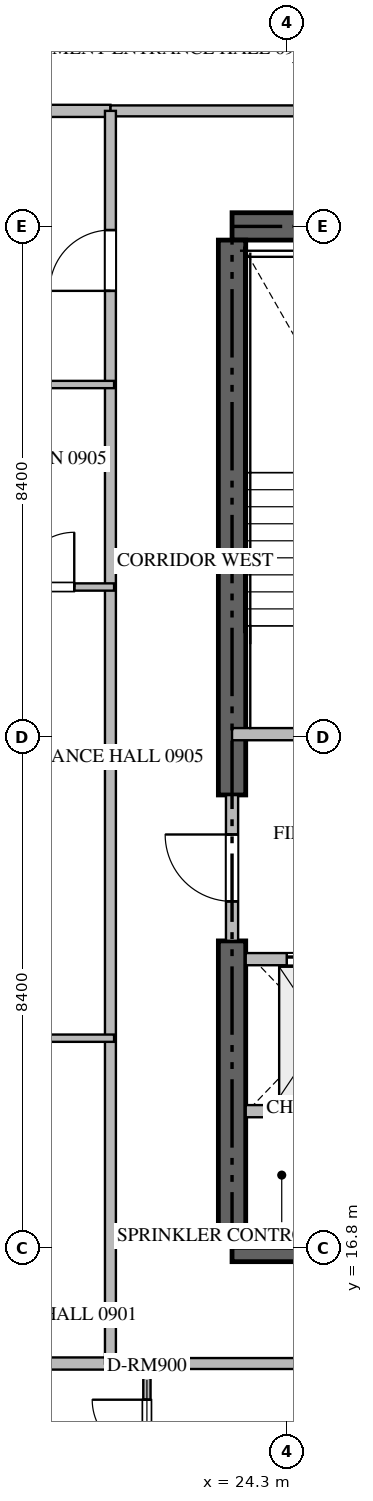
"""IFC4 building model, lengths in metres.
Left out: names, types, materials, properties, quantities, classifications, styles, units other than length and angle.
Written with IfcOpenShell. Run it as: python <this file> out.ifc"""

import sys

from ifc_helpers import new_model, si_unit, direction, frame, frame_2d, origin, place, context, subcontext, project, spatial, rectangle, extrude, source, transform, mapped, element, fill, save


model = new_model("IFC4")
c1 = context("Model", 3, precision=1e-05, world=origin(), true_north=direction((0.0, 1.0)))
c2 = subcontext(c1, "Body", "Model", "MODEL_VIEW")
j1 = project(units=[si_unit("LENGTHUNIT", "METRE"), si_unit("PLANEANGLEUNIT", "RADIAN")], contexts=[c1])
p1 = place(None, origin())
s1 = spatial("IfcSite", under=j1, at=p1, CompositionType="ELEMENT")
p2 = place(p1, origin())
s2 = spatial("IfcBuilding", under=s1, at=p2, CompositionType="ELEMENT")
p3 = place(p2, frame((0.0, 0.0, 41.7)))
s3 = spatial("IfcBuildingStorey", under=s2, at=p3, CompositionType="ELEMENT", Elevation=41.7)
for number, where, z_axis, x_axis in (
    (1, (23.4, 16.8, -0.26), (0.0, 0.0, 1.0), (1.0, 0.0, 0.0)),
    (2, (41.4, 33.6, -0.26), (0.0, 0.0, 1.0), (-1.0, 0.0, 0.0)),
):
    element("IfcWall", number, at=place(p3, frame(where, z_axis=z_axis, x_axis=x_axis)), inside=s3, PredefinedType="SHEAR", context=c2, shape_type="SweptSolid", body=[
        extrude(rectangle(XDim=18.0, YDim=0.45, at=frame_2d((9.0, 0.0))), origin(), (0.0, 0.0, 1.0), 3.748),
    ])
p4 = place(p3, frame((23.4, 17.025, -0.26), z_axis=(0.0, 0.0, 1.0), x_axis=(0.0, 1.0, 0.0)))
e3 = element("IfcWall", 3, at=p4, inside=s3, PredefinedType="SHEAR", context=c2, shape_type="SweptSolid", body=[
    extrude(rectangle(XDim=4.825, YDim=0.45, at=frame_2d((2.413, 0.0))), origin(), (0.0, 0.0, 1.0), 3.748),
])
p5 = place(p3, frame((23.4, 24.25, -0.26), z_axis=(0.0, 0.0, 1.0), x_axis=(0.0, 1.0, 0.0)))
e4 = element("IfcWall", 4, at=p5, inside=s3, PredefinedType="SHEAR", context=c2, shape_type="SweptSolid", body=[
    extrude(rectangle(XDim=9.125, YDim=0.45, at=frame_2d((4.562, 0.0))), origin(), (0.0, 0.0, 1.0), 3.748),
])
p6 = place(p3, frame((23.4, 25.25, 0.0), z_axis=(0.0, 0.0, 1.0), x_axis=(1.0, 0.0, 0.0)))
e5 = element("IfcWall", 5, at=p6, inside=s3, PredefinedType="STANDARD", context=c2, shape_type="SweptSolid", body=[
    extrude(rectangle(XDim=4.45, YDim=0.2, at=frame_2d((2.225, 0.0))), origin(), (0.0, 0.0, 1.0), 3.49),
])
p7 = place(p6, frame((1.65, 0.0, 0.0)))
e6 = element("IfcOpeningElement", 6, at=p7, cuts=e5, PredefinedType="OPENING", context=c2, shape_type="SweptSolid", body=[
    extrude(rectangle(XDim=1.1, YDim=2.15, at=frame_2d((0.55, 1.075))), frame((0.0, 0.11, 0.0), z_axis=(0.0, -1.0, 0.0), x_axis=(1.0, 0.0, 0.0)), (0.0, 0.0, 1.0), 0.22),
])
p8 = place(p3, frame((23.625, 21.55, 0.0), z_axis=(0.0, 0.0, 1.0), x_axis=(1.0, 0.0, 0.0)))
e7 = element("IfcWall", 7, at=p8, inside=s3, PredefinedType="STANDARD", context=c2, shape_type="SweptSolid", body=[
    extrude(rectangle(XDim=2.425, YDim=0.2, at=frame_2d((1.212, 0.0))), origin(), (0.0, 0.0, 1.0), 3.49),
])
p9 = place(p8, frame((0.675, 0.0, 0.0)))
e8 = element("IfcOpeningElement", 8, at=p9, cuts=e7, PredefinedType="OPENING", context=c2, shape_type="SweptSolid", body=[
    extrude(rectangle(XDim=1.2, YDim=2.2, at=frame_2d((0.6, 1.1))), frame((0.0, 0.11, 0.0), z_axis=(0.0, -1.0, 0.0), x_axis=(1.0, 0.0, 0.0)), (0.0, 0.0, 1.0), 0.22),
])
p10 = place(p3, frame((23.625, 19.05, 0.0), z_axis=(0.0, 0.0, 1.0), x_axis=(1.0, 0.0, 0.0)))
e9 = element("IfcWall", 9, at=p10, inside=s3, PredefinedType="STANDARD", context=c2, shape_type="SweptSolid", body=[
    extrude(rectangle(XDim=2.425, YDim=0.2, at=frame_2d((1.212, 0.0))), origin(), (0.0, 0.0, 1.0), 3.49),
])
p11 = place(p3, frame((23.4, 21.852, 0.0), z_axis=(0.0, 0.0, 1.0), x_axis=(0.0, 1.0, 0.0)))
e10 = element("IfcWall", 10, at=p11, inside=s3, PredefinedType="STANDARD", context=c2, shape_type="SweptSolid", body=[
    extrude(rectangle(XDim=2.396, YDim=0.2, at=frame_2d((1.198, 0.0))), origin(), (0.0, 0.0, 1.0), 3.49),
])
p12 = place(p11, frame((0.648, 0.0, 0.0)))
e11 = element("IfcOpeningElement", 11, at=p12, cuts=e10, PredefinedType="OPENING", context=c2, shape_type="SweptSolid", body=[
    extrude(rectangle(XDim=1.1, YDim=2.15, at=frame_2d((0.55, 1.075))), frame((0.0, 0.11, 0.0), z_axis=(0.0, -1.0, 0.0), x_axis=(1.0, 0.0, 0.0)), (0.0, 0.0, 1.0), 0.22),
])
for number, where, z_axis, x_axis in (
    (12, (6.082, 14.9, 0.0), (0.0, 0.0, 1.0), (1.0, 0.0, 0.0)),
    (13, (6.082, 35.5, 0.0), (0.0, 0.0, 1.0), (1.0, 0.0, 0.0)),
):
    element("IfcWall", number, at=place(p3, frame(where, z_axis=z_axis, x_axis=x_axis)), inside=s3, PredefinedType="PARTITIONING", context=c2, shape_type="SweptSolid", body=[
        extrude(rectangle(XDim=15.318, YDim=0.2, at=frame_2d((7.659, 0.0))), origin(), (0.0, 0.0, 1.0), 3.49),
    ])
p13 = place(p3, frame((21.402, 14.9, 0.0), z_axis=(0.0, 0.0, 1.0), x_axis=(1.0, 0.0, 0.0)))
e14 = element("IfcWall", 14, at=p13, inside=s3, PredefinedType="PARTITIONING", context=c2, shape_type="SweptSolid", body=[
    extrude(rectangle(XDim=21.996, YDim=0.18, at=frame_2d((10.998, 0.0))), origin(), (0.0, 0.0, 1.0), 3.49),
])
p14 = place(p13, frame((5.816, 0.0, 0.0)))
e15 = element("IfcOpeningElement", 15, at=p14, cuts=e14, PredefinedType="OPENING", context=c2, shape_type="SweptSolid", body=[
    extrude(rectangle(XDim=1.0, YDim=2.15, at=frame_2d((0.5, 1.075))), frame((0.0, 0.1, 0.0), z_axis=(0.0, -1.0, 0.0), x_axis=(1.0, 0.0, 0.0)), (0.0, 0.0, 1.0), 0.2),
])
p15 = place(p13, frame((11.044, 0.0, 0.0)))
e16 = element("IfcOpeningElement", 16, at=p15, cuts=e14, PredefinedType="OPENING", context=c2, shape_type="SweptSolid", body=[
    extrude(rectangle(XDim=1.0, YDim=2.15, at=frame_2d((0.5, 1.075))), frame((0.0, 0.1, 0.0), z_axis=(0.0, -1.0, 0.0), x_axis=(1.0, 0.0, 0.0)), (0.0, 0.0, 1.0), 0.2),
])
p16 = place(p3, frame((21.402, 35.5, 0.0), z_axis=(0.0, 0.0, 1.0), x_axis=(1.0, 0.0, 0.0)))
e17 = element("IfcWall", 17, at=p16, inside=s3, PredefinedType="PARTITIONING", context=c2, shape_type="SweptSolid", body=[
    extrude(rectangle(XDim=21.996, YDim=0.18, at=frame_2d((10.998, 0.0))), origin(), (0.0, 0.0, 1.0), 3.49),
])
p17 = place(p16, frame((9.952, 0.0, 0.0)))
e18 = element("IfcOpeningElement", 18, at=p17, cuts=e17, PredefinedType="OPENING", context=c2, shape_type="SweptSolid", body=[
    extrude(rectangle(XDim=1.0, YDim=2.15, at=frame_2d((0.5, 1.075))), frame((0.0, 0.1, 0.0), z_axis=(0.0, -1.0, 0.0), x_axis=(1.0, 0.0, 0.0)), (0.0, 0.0, 1.0), 0.2),
])
p18 = place(p16, frame((15.18, 0.0, 0.0)))
e19 = element("IfcOpeningElement", 19, at=p18, cuts=e17, PredefinedType="OPENING", context=c2, shape_type="SweptSolid", body=[
    extrude(rectangle(XDim=1.0, YDim=2.15, at=frame_2d((0.5, 1.075))), frame((0.0, 0.1, 0.0), z_axis=(0.0, -1.0, 0.0), x_axis=(1.0, 0.0, 0.0)), (0.0, 0.0, 1.0), 0.2),
])
p19 = place(p3, frame((21.4, 14.9, 0.0), z_axis=(0.0, 0.0, 1.0), x_axis=(0.0, 1.0, 0.0)))
e20 = element("IfcWall", 20, at=p19, inside=s3, PredefinedType="PARTITIONING", context=c2, shape_type="SweptSolid", body=[
    extrude(rectangle(XDim=20.6, YDim=0.18, at=frame_2d((10.3, 0.0))), origin(), (0.0, 0.0, 1.0), 3.49),
])
p20 = place(p19, frame((17.64, 0.0, 0.0)))
e21 = element("IfcOpeningElement", 21, at=p20, cuts=e20, PredefinedType="OPENING", context=c2, shape_type="SweptSolid", body=[
    extrude(rectangle(XDim=1.0, YDim=2.15, at=frame_2d((0.5, 1.075))), frame((0.0, 0.1, 0.0), z_axis=(0.0, -1.0, 0.0), x_axis=(1.0, 0.0, 0.0)), (0.0, 0.0, 1.0), 0.2),
])
p21 = place(p3, frame((22.0, 12.75, 0.0), z_axis=(0.0, 0.0, 1.0), x_axis=(0.0, 1.0, 0.0)))
e22 = element("IfcWall", 22, at=p21, inside=s3, PredefinedType="PARTITIONING", context=c2, shape_type="SweptSolid", body=[
    extrude(rectangle(XDim=2.21, YDim=0.12, at=frame_2d((1.105, 0.0))), origin(), (0.0, 0.0, 1.0), 3.49),
])
p22 = place(p21, frame((0.655, 0.0, 0.0)))
e23 = element("IfcOpeningElement", 23, at=p22, cuts=e22, PredefinedType="OPENING", context=c2, shape_type="SweptSolid", body=[
    extrude(rectangle(XDim=0.9, YDim=2.1, at=frame_2d((0.45, 1.05))), frame((0.0, 0.07, 0.0), z_axis=(0.0, -1.0, 0.0), x_axis=(1.0, 0.0, 0.0)), (0.0, 0.0, 1.0), 0.14),
])
p23 = place(p3, frame((18.65, 31.0, 0.0), z_axis=(0.0, 0.0, 1.0), x_axis=(1.0, 0.0, 0.0)))
e24 = element("IfcWall", 24, at=p23, inside=s3, PredefinedType="PARTITIONING", context=c2, shape_type="SweptSolid", body=[
    extrude(rectangle(XDim=2.81, YDim=0.12, at=frame_2d((1.405, 0.0))), origin(), (0.0, 0.0, 1.0), 3.49),
])
p24 = place(p3, frame((19.25, 27.67, 0.0), z_axis=(0.0, 0.0, 1.0), x_axis=(1.0, 0.0, 0.0)))
e25 = element("IfcWall", 25, at=p24, inside=s3, PredefinedType="PARTITIONING", context=c2, shape_type="SweptSolid", body=[
    extrude(rectangle(XDim=2.21, YDim=0.12, at=frame_2d((1.105, 0.0))), origin(), (0.0, 0.0, 1.0), 3.49),
])
p25 = place(p24, frame((0.655, 0.0, 0.0)))
e26 = element("IfcOpeningElement", 26, at=p25, cuts=e25, PredefinedType="OPENING", context=c2, shape_type="SweptSolid", body=[
    extrude(rectangle(XDim=0.9, YDim=2.1, at=frame_2d((0.45, 1.05))), frame((0.0, 0.07, 0.0), z_axis=(0.0, -1.0, 0.0), x_axis=(1.0, 0.0, 0.0)), (0.0, 0.0, 1.0), 0.14),
])
p26 = place(p3, frame((19.252, 20.25, 0.0), z_axis=(0.0, 0.0, 1.0), x_axis=(1.0, 0.0, 0.0)))
e27 = element("IfcWall", 27, at=p26, inside=s3, PredefinedType="PARTITIONING", context=c2, shape_type="SweptSolid", body=[
    extrude(rectangle(XDim=2.208, YDim=0.12, at=frame_2d((1.104, 0.0))), origin(), (0.0, 0.0, 1.0), 3.49),
])
m1 = source(origin(), c2, "Body", "SweptSolid", [
    extrude(rectangle(XDim=1.2, YDim=2.2, at=frame_2d((0.6, 1.1))), frame((0.0, 0.025, 0.0), z_axis=(0.0, -1.0, 0.0), x_axis=(1.0, 0.0, 0.0)), (0.0, 0.0, 1.0), 0.05),
])
p27 = place(p9, origin())
e28 = element("IfcDoor", 28, at=p27, inside=s3, OperationType="DOUBLE_DOOR_SLIDING", PredefinedType="DOOR", context=c2, shape_type="MappedRepresentation", body=[
    mapped(m1, transform((0.0, 0.0, 0.0), scale=1.0)),
])
fill(e8, e28)
m2 = source(origin(), c2, "Body", "SweptSolid", [
    extrude(rectangle(XDim=1.1, YDim=2.15, at=frame_2d((0.55, 1.075))), frame((0.0, 0.025, 0.0), z_axis=(0.0, -1.0, 0.0), x_axis=(1.0, 0.0, 0.0)), (0.0, 0.0, 1.0), 0.05),
])
p28 = place(p12, origin())
e29 = element("IfcDoor", 29, at=p28, inside=s3, OperationType="SINGLE_SWING_RIGHT", PredefinedType="DOOR", context=c2, shape_type="MappedRepresentation", body=[
    mapped(m2, transform((0.0, 0.0, 0.0), scale=1.0)),
])
fill(e11, e29)
m3 = source(origin(), c2, "Body", "SweptSolid", [
    extrude(rectangle(XDim=1.0, YDim=2.15, at=frame_2d((0.5, 1.075))), frame((0.0, 0.025, 0.0), z_axis=(0.0, -1.0, 0.0), x_axis=(1.0, 0.0, 0.0)), (0.0, 0.0, 1.0), 0.05),
])
p29 = place(p20, origin())
e30 = element("IfcDoor", 30, at=p29, inside=s3, OperationType="SINGLE_SWING_LEFT", PredefinedType="DOOR", context=c2, shape_type="MappedRepresentation", body=[
    mapped(m3, transform((0.0, 0.0, 0.0), scale=1.0)),
])
fill(e21, e30)
m4 = source(origin(), c2, "Body", "SweptSolid", [
    extrude(rectangle(XDim=0.9, YDim=2.1, at=frame_2d((0.45, 1.05))), frame((0.0, 0.025, 0.0), z_axis=(0.0, -1.0, 0.0), x_axis=(1.0, 0.0, 0.0)), (0.0, 0.0, 1.0), 0.05),
])
p30 = place(p22, origin())
e31 = element("IfcDoor", 31, at=p30, inside=s3, OperationType="SINGLE_SWING_RIGHT", PredefinedType="DOOR", context=c2, shape_type="MappedRepresentation", body=[
    mapped(m4, transform((0.0, 0.0, 0.0), scale=1.0)),
])
fill(e23, e31)
p31 = place(p25, origin())
e32 = element("IfcDoor", 32, at=p31, inside=s3, OperationType="SINGLE_SWING_RIGHT", PredefinedType="DOOR", context=c2, shape_type="MappedRepresentation", body=[
    mapped(m4, transform((0.0, 0.0, 0.0), scale=1.0)),
])
fill(e26, e32)
save(model, sys.argv[1])
